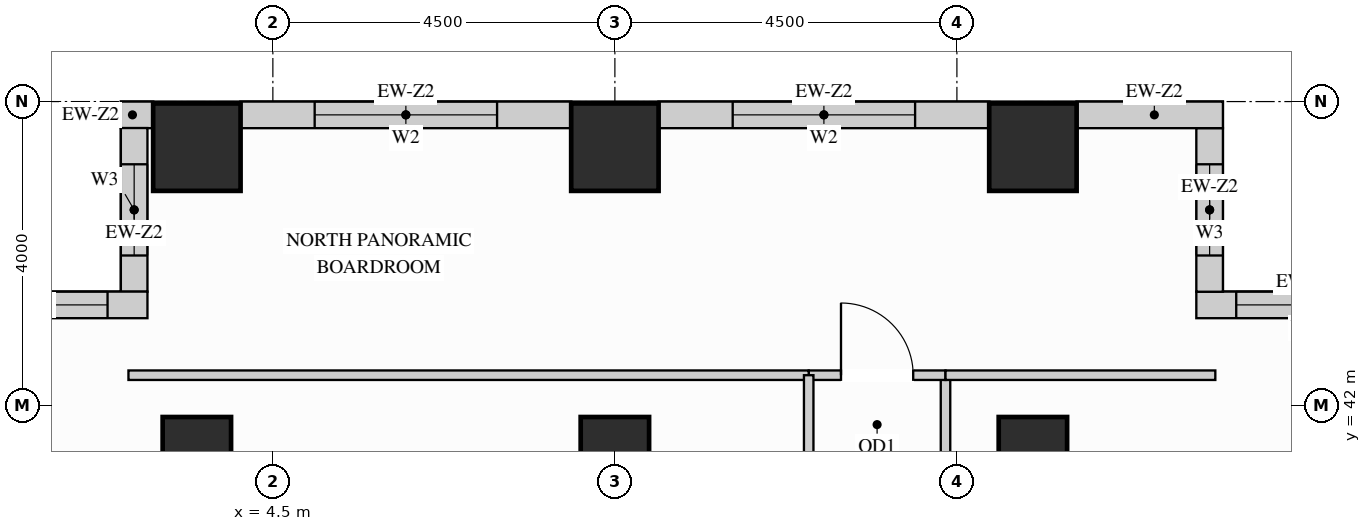
"""IFC4 building model, lengths in metres.
Left out: names, types, materials, properties, quantities, classifications, styles, units other than length and angle.
Written with IfcOpenShell. Run it as: python <this file> out.ifc"""

import sys

from ifc_helpers import new_model, si_unit, direction, frame, frame_2d, origin, origin_2d, place, context, subcontext, project, spatial, rectangle, extrude, source, transform, mapped, element, fill, save


model = new_model("IFC4")
c1 = context("Model", 3, precision=1e-05, world=origin(), true_north=direction((0.0, 1.0)))
c2 = subcontext(c1, "Body", "Model", "MODEL_VIEW")
j1 = project(units=[si_unit("LENGTHUNIT", "METRE"), si_unit("PLANEANGLEUNIT", "RADIAN")], contexts=[c1])
p1 = place(None, origin())
s1 = spatial("IfcSite", under=j1, at=p1, CompositionType="ELEMENT")
p2 = place(p1, origin())
s2 = spatial("IfcBuilding", under=s1, at=p2, CompositionType="ELEMENT")
p3 = place(p2, frame((0.0, 0.0, 113.4)))
s3 = spatial("IfcBuildingStorey", under=s2, at=p3, CompositionType="ELEMENT", Elevation=113.4)
m1 = source(origin(), c2, "Body", "SweptSolid", [
    extrude(rectangle(XDim=0.9, YDim=0.9, at=origin_2d()), origin(), (0.0, 0.0, 1.0), 3.38),
])
for number, where, z_axis, x_axis in (
    (1, (14.5, 41.4, 0.0), (0.0, 0.0, 1.0), (1.0, 0.0, 0.0)),
    (2, (3.5, 41.4, 0.0), (0.0, 0.0, 1.0), (1.0, 0.0, 0.0)),
    (3, (9.0, 41.4, 0.0), (0.0, 0.0, 1.0), (1.0, 0.0, 0.0)),
):
    element("IfcColumn", number, at=place(p3, frame(where, z_axis=z_axis, x_axis=x_axis)), inside=s3, PredefinedType="COLUMN", context=c2, shape_type="MappedRepresentation", body=[
        mapped(m1, transform((0.0, 0.0, 0.0), x_axis=(1.0, 0.0, 0.0), y_axis=(0.0, 1.0, 0.0), z_axis=(0.0, 0.0, 1.0))),
    ])
m2 = source(origin(), c2, "Body", "SweptSolid", [
    extrude(rectangle(XDim=1.15, YDim=1.15, at=origin_2d()), origin(), (0.0, 0.0, 1.0), 3.38),
])
for number, where, z_axis, x_axis in (
    (4, (14.5, 45.4, 0.0), (0.0, 0.0, 1.0), (1.0, 0.0, 0.0)),
    (5, (3.5, 45.4, 0.0), (0.0, 0.0, 1.0), (1.0, 0.0, 0.0)),
    (6, (9.0, 45.4, 0.0), (0.0, 0.0, 1.0), (1.0, 0.0, 0.0)),
):
    element("IfcColumn", number, at=place(p3, frame(where, z_axis=z_axis, x_axis=x_axis)), inside=s3, PredefinedType="COLUMN", context=c2, shape_type="MappedRepresentation", body=[
        mapped(m2, transform((0.0, 0.0, 0.0), x_axis=(1.0, 0.0, 0.0), y_axis=(0.0, 1.0, 0.0), z_axis=(0.0, 0.0, 1.0))),
    ])
p4 = place(p3, frame((19.5, 43.325, 0.0), z_axis=(0.0, 0.0, 1.0), x_axis=(-1.0, 0.0, 0.0)))
e7 = element("IfcWall", 7, at=p4, inside=s3, PredefinedType="SOLIDWALL", context=c2, shape_type="SweptSolid", body=[
    extrude(rectangle(XDim=2.85, YDim=0.35, at=frame_2d((1.425, 0.0))), origin(), (0.0, 0.0, 1.0), 3.365),
])
p5 = place(p4, frame((0.525, 0.0, 0.78)))
e8 = element("IfcOpeningElement", 8, at=p5, cuts=e7, PredefinedType="OPENING", context=c2, shape_type="SweptSolid", body=[
    extrude(rectangle(XDim=1.8, YDim=2.1, at=frame_2d((0.9, 1.05))), frame((0.0, 0.185, 0.0), z_axis=(0.0, -1.0, 0.0), x_axis=(1.0, 0.0, 0.0)), (0.0, 0.0, 1.0), 0.37),
])
p6 = place(p3, frame((16.825, 43.498, 0.0), z_axis=(0.0, 0.0, 1.0), x_axis=(0.0, 1.0, 0.0)))
e9 = element("IfcWall", 9, at=p6, inside=s3, PredefinedType="SOLIDWALL", context=c2, shape_type="SweptSolid", body=[
    extrude(rectangle(XDim=2.154, YDim=0.35, at=frame_2d((1.077, 0.0))), origin(), (0.0, 0.0, 1.0), 3.365),
])
p7 = place(p6, frame((0.477, 0.0, 0.78)))
e10 = element("IfcOpeningElement", 10, at=p7, cuts=e9, PredefinedType="OPENING", context=c2, shape_type="SweptSolid", body=[
    extrude(rectangle(XDim=1.2, YDim=2.1, at=frame_2d((0.6, 1.05))), frame((0.0, 0.185, 0.0), z_axis=(0.0, -1.0, 0.0), x_axis=(1.0, 0.0, 0.0)), (0.0, 0.0, 1.0), 0.37),
])
m3 = source(origin(), c2, "Body", "SweptSolid", [
    extrude(rectangle(XDim=1.927, YDim=0.35, at=frame_2d((0.963, 0.0))), origin(), (0.0, 0.0, 1.0), 3.365),
])
p8 = place(p3, frame((17.0, 45.825, 0.0), z_axis=(0.0, 0.0, 1.0), x_axis=(-1.0, 0.0, 0.0)))
e11 = element("IfcWall", 11, at=p8, inside=s3, PredefinedType="SOLIDWALL", context=c2, shape_type="MappedRepresentation", body=[
    mapped(m3, transform((0.0, 0.0, 0.0), x_axis=(1.0, 0.0, 0.0), y_axis=(0.0, 1.0, 0.0), z_axis=(0.0, 0.0, 1.0))),
])
p9 = place(p3, frame((13.927, 45.825, 0.0), z_axis=(0.0, 0.0, 1.0), x_axis=(-1.0, 0.0, 0.0)))
e12 = element("IfcWall", 12, at=p9, inside=s3, PredefinedType="SOLIDWALL", context=c2, shape_type="SweptSolid", body=[
    extrude(rectangle(XDim=4.354, YDim=0.35, at=frame_2d((2.177, 0.0))), origin(), (0.0, 0.0, 1.0), 3.365),
])
p10 = place(p9, frame((0.977, 0.0, 0.78)))
e13 = element("IfcOpeningElement", 13, at=p10, cuts=e12, PredefinedType="OPENING", context=c2, shape_type="SweptSolid", body=[
    extrude(rectangle(XDim=2.4, YDim=2.1, at=frame_2d((1.2, 1.05))), frame((0.0, 0.185, 0.0), z_axis=(0.0, -1.0, 0.0), x_axis=(1.0, 0.0, 0.0)), (0.0, 0.0, 1.0), 0.37),
])
p11 = place(p3, frame((8.427, 45.825, 0.0), z_axis=(0.0, 0.0, 1.0), x_axis=(-1.0, 0.0, 0.0)))
e14 = element("IfcWall", 14, at=p11, inside=s3, PredefinedType="SOLIDWALL", context=c2, shape_type="SweptSolid", body=[
    extrude(rectangle(XDim=4.354, YDim=0.35, at=frame_2d((2.177, 0.0))), origin(), (0.0, 0.0, 1.0), 3.365),
])
p12 = place(p11, frame((0.977, 0.0, 0.78)))
e15 = element("IfcOpeningElement", 15, at=p12, cuts=e14, PredefinedType="OPENING", context=c2, shape_type="SweptSolid", body=[
    extrude(rectangle(XDim=2.4, YDim=2.1, at=frame_2d((1.2, 1.05))), frame((0.0, 0.185, 0.0), z_axis=(0.0, -1.0, 0.0), x_axis=(1.0, 0.0, 0.0)), (0.0, 0.0, 1.0), 0.37),
])
m4 = source(origin(), c2, "Body", "SweptSolid", [
    extrude(rectangle(XDim=0.427, YDim=0.35, at=frame_2d((0.213, 0.0))), origin(), (0.0, 0.0, 1.0), 3.365),
])
p13 = place(p3, frame((2.927, 45.825, 0.0), z_axis=(0.0, 0.0, 1.0), x_axis=(-1.0, 0.0, 0.0)))
e16 = element("IfcWall", 16, at=p13, inside=s3, PredefinedType="SOLIDWALL", context=c2, shape_type="MappedRepresentation", body=[
    mapped(m4, transform((0.0, 0.0, 0.0), x_axis=(1.0, 0.0, 0.0), y_axis=(0.0, 1.0, 0.0), z_axis=(0.0, 0.0, 1.0))),
])
p14 = place(p3, frame((2.675, 45.652, 0.0), z_axis=(0.0, 0.0, 1.0), x_axis=(0.0, -1.0, 0.0)))
e17 = element("IfcWall", 17, at=p14, inside=s3, PredefinedType="SOLIDWALL", context=c2, shape_type="SweptSolid", body=[
    extrude(rectangle(XDim=2.154, YDim=0.35, at=frame_2d((1.077, 0.0))), origin(), (0.0, 0.0, 1.0), 3.365),
])
p15 = place(p14, frame((0.477, 0.0, 0.78)))
e18 = element("IfcOpeningElement", 18, at=p15, cuts=e17, PredefinedType="OPENING", context=c2, shape_type="SweptSolid", body=[
    extrude(rectangle(XDim=1.2, YDim=2.1, at=frame_2d((0.6, 1.05))), frame((0.0, 0.185, 0.0), z_axis=(0.0, -1.0, 0.0), x_axis=(1.0, 0.0, 0.0)), (0.0, 0.0, 1.0), 0.37),
])
p16 = place(p3, frame((2.85, 43.325, 0.0), z_axis=(0.0, 0.0, 1.0), x_axis=(-1.0, 0.0, 0.0)))
e19 = element("IfcWall", 19, at=p16, inside=s3, PredefinedType="SOLIDWALL", context=c2, shape_type="SweptSolid", body=[
    extrude(rectangle(XDim=2.85, YDim=0.35, at=frame_2d((1.425, 0.0))), origin(), (0.0, 0.0, 1.0), 3.365),
])
p17 = place(p16, frame((0.525, 0.0, 0.78)))
e20 = element("IfcOpeningElement", 20, at=p17, cuts=e19, PredefinedType="OPENING", context=c2, shape_type="SweptSolid", body=[
    extrude(rectangle(XDim=1.8, YDim=2.1, at=frame_2d((0.9, 1.05))), frame((0.0, 0.185, 0.0), z_axis=(0.0, -1.0, 0.0), x_axis=(1.0, 0.0, 0.0)), (0.0, 0.0, 1.0), 0.37),
])
p18 = place(p3, frame((13.35, 37.428, 0.0), z_axis=(0.0, 0.0, 1.0), x_axis=(0.0, 1.0, 0.0)))
e21 = element("IfcWall", 21, at=p18, inside=s3, PredefinedType="PARTITIONING", context=c2, shape_type="SweptSolid", body=[
    extrude(rectangle(XDim=4.972, YDim=0.125, at=frame_2d((2.486, 0.0))), origin(), (0.0, 0.0, 1.0), 3.365),
])
p19 = place(p18, frame((2.011, 0.0, 0.0)))
e22 = element("IfcOpeningElement", 22, at=p19, cuts=e21, PredefinedType="OPENING", context=c2, shape_type="SweptSolid", body=[
    extrude(rectangle(XDim=0.95, YDim=2.15, at=frame_2d((0.475, 1.075))), frame((0.0, 0.073, 0.0), z_axis=(0.0, -1.0, 0.0), x_axis=(1.0, 0.0, 0.0)), (0.0, 0.0, 1.0), 0.145),
])
p20 = place(p3, frame((11.55, 42.4, 0.0), z_axis=(0.0, 0.0, 1.0), x_axis=(1.0, 0.0, 0.0)))
e23 = element("IfcWall", 23, at=p20, inside=s3, PredefinedType="PARTITIONING", context=c2, shape_type="SweptSolid", body=[
    extrude(rectangle(XDim=1.8, YDim=0.125, at=frame_2d((0.9, 0.0))), origin(), (0.0, 0.0, 1.0), 3.365),
])
p21 = place(p20, frame((0.425, 0.0, 0.0)))
e24 = element("IfcOpeningElement", 24, at=p21, cuts=e23, PredefinedType="OPENING", context=c2, shape_type="SweptSolid", body=[
    extrude(rectangle(XDim=0.95, YDim=2.15, at=frame_2d((0.475, 1.075))), frame((0.0, 0.073, 0.0), z_axis=(0.0, -1.0, 0.0), x_axis=(1.0, 0.0, 0.0)), (0.0, 0.0, 1.0), 0.145),
])
m5 = source(origin(), c2, "Body", "SweptSolid", [
    extrude(rectangle(XDim=3.55, YDim=0.125, at=frame_2d((1.775, 0.0))), origin(), (0.0, 0.0, 1.0), 3.365),
])
p22 = place(p3, frame((13.35, 42.4, 0.0), z_axis=(0.0, 0.0, 1.0), x_axis=(1.0, 0.0, 0.0)))
e25 = element("IfcWall", 25, at=p22, inside=s3, PredefinedType="PARTITIONING", context=c2, shape_type="MappedRepresentation", body=[
    mapped(m5, transform((0.0, 0.0, 0.0), x_axis=(1.0, 0.0, 0.0), y_axis=(0.0, 1.0, 0.0), z_axis=(0.0, 0.0, 1.0))),
])
m6 = source(origin(), c2, "Body", "SweptSolid", [
    extrude(rectangle(XDim=8.95, YDim=0.125, at=frame_2d((4.475, 0.0))), origin(), (0.0, 0.0, 1.0), 3.365),
])
p23 = place(p3, frame((2.6, 42.4, 0.0), z_axis=(0.0, 0.0, 1.0), x_axis=(1.0, 0.0, 0.0)))
e26 = element("IfcWall", 26, at=p23, inside=s3, PredefinedType="PARTITIONING", context=c2, shape_type="MappedRepresentation", body=[
    mapped(m6, transform((0.0, 0.0, 0.0), x_axis=(1.0, 0.0, 0.0), y_axis=(0.0, 1.0, 0.0), z_axis=(0.0, 0.0, 1.0))),
])
p24 = place(p3, frame((11.55, 36.322, 0.0), z_axis=(0.0, 0.0, 1.0), x_axis=(0.0, 1.0, 0.0)))
e27 = element("IfcWall", 27, at=p24, inside=s3, PredefinedType="PARTITIONING", context=c2, shape_type="SweptSolid", body=[
    extrude(rectangle(XDim=6.078, YDim=0.125, at=frame_2d((3.039, 0.0))), origin(), (0.0, 0.0, 1.0), 3.365),
])
p25 = place(p24, frame((2.564, 0.0, 0.0)))
e28 = element("IfcOpeningElement", 28, at=p25, cuts=e27, PredefinedType="OPENING", context=c2, shape_type="SweptSolid", body=[
    extrude(rectangle(XDim=0.95, YDim=2.15, at=frame_2d((0.475, 1.075))), frame((0.0, 0.073, 0.0), z_axis=(0.0, -1.0, 0.0), x_axis=(1.0, 0.0, 0.0)), (0.0, 0.0, 1.0), 0.145),
])
m7 = source(origin(), c2, "Body", "SweptSolid", [
    extrude(rectangle(XDim=0.95, YDim=2.15, at=frame_2d((0.475, 1.075))), frame((0.0, 0.025, 0.0), z_axis=(0.0, -1.0, 0.0), x_axis=(1.0, 0.0, 0.0)), (0.0, 0.0, 1.0), 0.05),
])
p26 = place(p21, origin())
e29 = element("IfcDoor", 29, at=p26, inside=s3, OperationType="SINGLE_SWING_LEFT", PredefinedType="DOOR", context=c2, shape_type="MappedRepresentation", body=[
    mapped(m7, transform((0.0, 0.0, 0.0), x_axis=(1.0, 0.0, 0.0), y_axis=(0.0, 1.0, 0.0), z_axis=(0.0, 0.0, 1.0))),
])
fill(e24, e29)
m8 = source(origin(), c2, "Body", "SweptSolid", [
    extrude(rectangle(XDim=1.8, YDim=2.1, at=frame_2d((0.9, 1.05))), frame((0.0, 0.03, 0.0), z_axis=(0.0, -1.0, 0.0), x_axis=(1.0, 0.0, 0.0)), (0.0, 0.0, 1.0), 0.06),
])
p27 = place(p5, origin())
e30 = element("IfcWindow", 30, at=p27, inside=s3, PartitioningType="SINGLE_PANEL", PredefinedType="WINDOW", context=c2, shape_type="MappedRepresentation", body=[
    mapped(m8, transform((0.0, 0.0, 0.0), x_axis=(1.0, 0.0, 0.0), y_axis=(0.0, 1.0, 0.0), z_axis=(0.0, 0.0, 1.0))),
])
fill(e8, e30)
p28 = place(p17, origin())
e31 = element("IfcWindow", 31, at=p28, inside=s3, PartitioningType="SINGLE_PANEL", PredefinedType="WINDOW", context=c2, shape_type="MappedRepresentation", body=[
    mapped(m8, transform((0.0, 0.0, 0.0), x_axis=(1.0, 0.0, 0.0), y_axis=(0.0, 1.0, 0.0), z_axis=(0.0, 0.0, 1.0))),
])
fill(e20, e31)
m9 = source(origin(), c2, "Body", "SweptSolid", [
    extrude(rectangle(XDim=2.4, YDim=2.1, at=frame_2d((1.2, 1.05))), frame((0.0, 0.03, 0.0), z_axis=(0.0, -1.0, 0.0), x_axis=(1.0, 0.0, 0.0)), (0.0, 0.0, 1.0), 0.06),
])
p29 = place(p10, origin())
e32 = element("IfcWindow", 32, at=p29, inside=s3, PartitioningType="SINGLE_PANEL", PredefinedType="WINDOW", context=c2, shape_type="MappedRepresentation", body=[
    mapped(m9, transform((0.0, 0.0, 0.0), x_axis=(1.0, 0.0, 0.0), y_axis=(0.0, 1.0, 0.0), z_axis=(0.0, 0.0, 1.0))),
])
fill(e13, e32)
p30 = place(p12, origin())
e33 = element("IfcWindow", 33, at=p30, inside=s3, PartitioningType="SINGLE_PANEL", PredefinedType="WINDOW", context=c2, shape_type="MappedRepresentation", body=[
    mapped(m9, transform((0.0, 0.0, 0.0), x_axis=(1.0, 0.0, 0.0), y_axis=(0.0, 1.0, 0.0), z_axis=(0.0, 0.0, 1.0))),
])
fill(e15, e33)
m10 = source(origin(), c2, "Body", "SweptSolid", [
    extrude(rectangle(XDim=1.2, YDim=2.1, at=frame_2d((0.6, 1.05))), frame((0.0, 0.03, 0.0), z_axis=(0.0, -1.0, 0.0), x_axis=(1.0, 0.0, 0.0)), (0.0, 0.0, 1.0), 0.06),
])
p31 = place(p7, origin())
e34 = element("IfcWindow", 34, at=p31, inside=s3, PartitioningType="SINGLE_PANEL", PredefinedType="WINDOW", context=c2, shape_type="MappedRepresentation", body=[
    mapped(m10, transform((0.0, 0.0, 0.0), x_axis=(1.0, 0.0, 0.0), y_axis=(0.0, 1.0, 0.0), z_axis=(0.0, 0.0, 1.0))),
])
fill(e10, e34)
p32 = place(p15, origin())
e35 = element("IfcWindow", 35, at=p32, inside=s3, PartitioningType="SINGLE_PANEL", PredefinedType="WINDOW", context=c2, shape_type="MappedRepresentation", body=[
    mapped(m10, transform((0.0, 0.0, 0.0), x_axis=(1.0, 0.0, 0.0), y_axis=(0.0, 1.0, 0.0), z_axis=(0.0, 0.0, 1.0))),
])
fill(e18, e35)
save(model, sys.argv[1])
